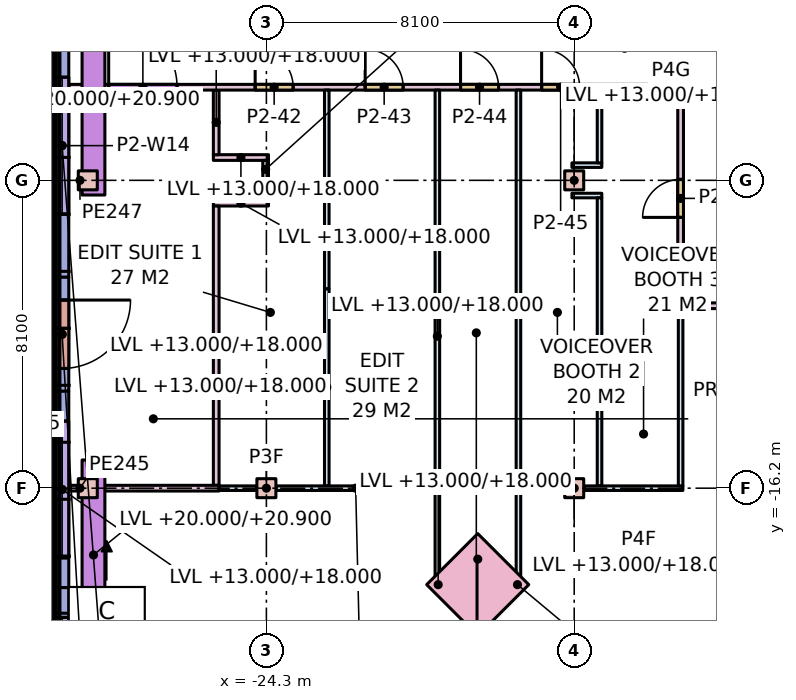
"""IFC4 building model, lengths in metres.
Left out: names, types, materials, properties, quantities, classifications, styles, units other than length and angle.
Written with IfcOpenShell. Run it as: python <this file> out.ifc"""

import sys

from ifc_helpers import new_model, si_unit, direction, frame, frame_2d, origin, origin_2d, place, context, subcontext, project, spatial, rectangle, extrude, element, fill, save


model = new_model("IFC4")
c1 = context("Model", 3, precision=1e-05, world=origin(), true_north=direction((0.0, 1.0)))
c2 = subcontext(c1, "Body", "Model", "MODEL_VIEW")
j1 = project(units=[si_unit("LENGTHUNIT", "METRE"), si_unit("PLANEANGLEUNIT", "RADIAN")], contexts=[c1])
p1 = place(None, origin())
s1 = spatial("IfcSite", under=j1, at=p1, CompositionType="ELEMENT")
p2 = place(p1, origin())
s2 = spatial("IfcBuilding", under=s1, at=p2, CompositionType="ELEMENT")
p3 = place(p2, frame((0.0, 0.0, 13.0)))
s3 = spatial("IfcBuildingStorey", under=s2, at=p3, CompositionType="ELEMENT", Elevation=13.0)
p4 = place(p3, frame((-24.3, -16.2, 0.0), z_axis=(0.0, 0.0, 1.0), x_axis=(1.0, 0.0, 0.0)))
e1 = element("IfcColumn", 1, at=p4, inside=s3, PredefinedType="COLUMN", context=c2, shape_type="SweptSolid", body=[
    extrude(rectangle(XDim=0.5, YDim=0.5, at=origin_2d()), origin(), (0.0, 0.0, 1.0), 7.0),
])
for number, where, z_axis, x_axis in (
    (2, (-16.2, -16.2, 0.0), (0.0, 0.0, 1.0), (1.0, 0.0, 0.0)),
    (3, (-16.2, -8.1, 0.0), (0.0, 0.0, 1.0), (1.0, 0.0, 0.0)),
):
    element("IfcColumn", number, at=place(p3, frame(where, z_axis=z_axis, x_axis=x_axis)), inside=s3, PredefinedType="COLUMN", context=c2, shape_type="SweptSolid", body=[
        extrude(rectangle(XDim=0.5, YDim=0.5, at=origin_2d()), origin(), (0.0, 0.0, 1.0), 5.0),
    ])
for number, where, z_axis, x_axis in (
    (4, (-29.0, -16.2, 0.0), (0.0, 0.0, 1.0), (1.0, 0.0, 0.0)),
    (5, (-29.0, -8.1, 0.0), (0.0, 0.0, 1.0), (1.0, 0.0, 0.0)),
):
    element("IfcColumn", number, at=place(p3, frame(where, z_axis=z_axis, x_axis=x_axis)), inside=s3, PredefinedType="COLUMN", context=c2, shape_type="SweptSolid", body=[
        extrude(rectangle(XDim=0.5, YDim=0.5, at=origin_2d()), origin(), (0.0, 0.0, 1.0), 7.0),
    ])
p5 = place(p3, frame((-18.738, -18.738, 0.0), z_axis=(0.0, 0.0, 1.0), x_axis=(0.707106781187, -0.707106781187, 0.0)))
e6 = element("IfcColumn", 6, at=p5, inside=s3, PredefinedType="COLUMN", context=c2, shape_type="SweptSolid", body=[
    extrude(rectangle(XDim=1.9, YDim=1.9, at=origin_2d()), origin(), (0.0, 0.0, 1.0), 5.0),
])
p6 = place(p3, frame((-29.675, -3.723, 0.0), z_axis=(0.0, 0.0, 1.0), x_axis=(0.0, -1.0, 0.0)))
e7 = element("IfcWall", 7, at=p6, inside=s3, PredefinedType="STANDARD", context=c2, shape_type="SweptSolid", body=[
    extrude(rectangle(XDim=6.927, YDim=0.35, at=frame_2d((3.463, 0.0))), origin(), (0.0, 0.0, 1.0), 5.0),
])
p7 = place(p6, frame((1.663, 0.0, 1.0)))
e8 = element("IfcOpeningElement", 8, at=p7, cuts=e7, PredefinedType="OPENING", context=c2, shape_type="SweptSolid", body=[
    extrude(rectangle(XDim=3.6, YDim=4.0, at=frame_2d((1.8, 2.0))), frame((0.0, 0.185, 0.0), z_axis=(0.0, -1.0, 0.0), x_axis=(1.0, 0.0, 0.0)), (0.0, 0.0, 1.0), 0.37),
])
p8 = place(p3, frame((-29.675, -10.65, 0.0), z_axis=(0.0, 0.0, 1.0), x_axis=(0.0, -1.0, 0.0)))
e9 = element("IfcWall", 9, at=p8, inside=s3, PredefinedType="STANDARD", context=c2, shape_type="SweptSolid", body=[
    extrude(rectangle(XDim=3.0, YDim=0.35, at=frame_2d((1.5, 0.0))), origin(), (0.0, 0.0, 1.0), 5.0),
])
p9 = place(p8, frame((0.6, 0.0, 0.0)))
e10 = element("IfcOpeningElement", 10, at=p9, cuts=e9, PredefinedType="OPENING", context=c2, shape_type="SweptSolid", body=[
    extrude(rectangle(XDim=1.8, YDim=2.7, at=frame_2d((0.9, 1.35))), frame((0.0, 0.185, 0.0), z_axis=(0.0, -1.0, 0.0), x_axis=(1.0, 0.0, 0.0)), (0.0, 0.0, 1.0), 0.37),
])
p10 = place(p3, frame((-29.675, -13.65, 0.0), z_axis=(0.0, 0.0, 1.0), x_axis=(0.0, -1.0, 0.0)))
e11 = element("IfcWall", 11, at=p10, inside=s3, PredefinedType="STANDARD", context=c2, shape_type="SweptSolid", body=[
    extrude(rectangle(XDim=5.167, YDim=0.35, at=frame_2d((2.583, 0.0))), origin(), (0.0, 0.0, 1.0), 5.0),
])
p11 = place(p10, frame((0.783, 0.0, 1.0)))
e12 = element("IfcOpeningElement", 12, at=p11, cuts=e11, PredefinedType="OPENING", context=c2, shape_type="SweptSolid", body=[
    extrude(rectangle(XDim=3.6, YDim=4.0, at=frame_2d((1.8, 2.0))), frame((0.0, 0.185, 0.0), z_axis=(0.0, -1.0, 0.0), x_axis=(1.0, 0.0, 0.0)), (0.0, 0.0, 1.0), 0.37),
])
p12 = place(p3, frame((-29.675, -18.817, 0.0), z_axis=(0.0, 0.0, 1.0), x_axis=(0.0, -1.0, 0.0)))
e13 = element("IfcWall", 13, at=p12, inside=s3, PredefinedType="STANDARD", context=c2, shape_type="SweptSolid", body=[
    extrude(rectangle(XDim=5.167, YDim=0.35, at=frame_2d((2.583, 0.0))), origin(), (0.0, 0.0, 1.0), 5.0),
])
p13 = place(p12, frame((0.783, 0.0, 1.0)))
e14 = element("IfcOpeningElement", 14, at=p13, cuts=e13, PredefinedType="OPENING", context=c2, shape_type="SweptSolid", body=[
    extrude(rectangle(XDim=3.6, YDim=4.0, at=frame_2d((1.8, 2.0))), frame((0.0, 0.185, 0.0), z_axis=(0.0, -1.0, 0.0), x_axis=(1.0, 0.0, 0.0)), (0.0, 0.0, 1.0), 0.37),
])
for number, where, z_axis, x_axis in (
    (15, (-28.85, -3.486, 7.0), (0.0, 0.0, 1.0), (0.0, -1.0, 0.0)),
    (16, (-28.85, -15.458, 7.0), (0.0, 0.0, 1.0), (0.0, -1.0, 0.0)),
):
    element("IfcWall", number, at=place(p3, frame(where, z_axis=z_axis, x_axis=x_axis)), inside=s3, PredefinedType="PARAPET", context=c2, shape_type="SweptSolid", body=[
        extrude(rectangle(XDim=5.0, YDim=0.6, at=frame_2d((2.5, 0.0))), origin(), (0.0, 0.0, 1.0), 0.9),
    ])
p14 = place(p3, frame((-22.711, -16.14, 0.0), z_axis=(0.0, 0.0, 1.0), x_axis=(0.0, 1.0, 0.0)))
e17 = element("IfcWall", 17, at=p14, inside=s3, PredefinedType="PARTITIONING", context=c2, shape_type="SweptSolid", body=[
    extrude(rectangle(XDim=5.188, YDim=0.12, at=frame_2d((2.594, 0.0))), origin(), (0.0, 0.0, 1.0), 5.0),
])
p15 = place(p3, frame((-22.711, -10.952, 0.0), z_axis=(0.0, 0.0, 1.0), x_axis=(0.0, 1.0, 0.0)))
e18 = element("IfcWall", 18, at=p15, inside=s3, PredefinedType="PARTITIONING", context=c2, shape_type="SweptSolid", body=[
    extrude(rectangle(XDim=5.227, YDim=0.12, at=frame_2d((2.614, 0.0))), origin(), (0.0, 0.0, 1.0), 6.68),
])
for number, where, z_axis, x_axis in (
    (19, (-25.696, -8.7, 0.0), (0.0, 0.0, 1.0), (1.0, 0.0, 0.0)),
    (20, (-25.696, -7.5, 0.0), (0.0, 0.0, 1.0), (1.0, 0.0, 0.0)),
):
    element("IfcWall", number, at=place(p3, frame(where, z_axis=z_axis, x_axis=x_axis)), inside=s3, PredefinedType="PARTITIONING", context=c2, shape_type="SweptSolid", body=[
        extrude(rectangle(XDim=1.45, YDim=0.15, at=frame_2d((0.725, 0.0))), origin(), (0.0, 0.0, 1.0), 5.0),
    ])
p16 = place(p3, frame((-25.621, -16.125, 0.0), z_axis=(0.0, 0.0, 1.0), x_axis=(0.0, 1.0, 0.0)))
e21 = element("IfcWall", 21, at=p16, inside=s3, PredefinedType="PARTITIONING", context=c2, shape_type="SweptSolid", body=[
    extrude(rectangle(XDim=7.35, YDim=0.15, at=frame_2d((3.675, 0.0))), origin(), (0.0, 0.0, 1.0), 5.0),
])
p17 = place(p3, frame((-25.621, -7.425, 0.0), z_axis=(0.0, 0.0, 1.0), x_axis=(0.0, 1.0, 0.0)))
e22 = element("IfcWall", 22, at=p17, inside=s3, PredefinedType="PARTITIONING", context=c2, shape_type="SweptSolid", body=[
    extrude(rectangle(XDim=1.7, YDim=0.15, at=frame_2d((0.85, 0.0))), origin(), (0.0, 0.0, 1.0), 5.0),
])
p18 = place(p3, frame((-24.32, -8.625, 0.0), z_axis=(0.0, 0.0, 1.0), x_axis=(0.0, 1.0, 0.0)))
e23 = element("IfcWall", 23, at=p18, inside=s3, PredefinedType="PARTITIONING", context=c2, shape_type="SweptSolid", body=[
    extrude(rectangle(XDim=1.05, YDim=0.15, at=frame_2d((0.525, 0.0))), origin(), (0.0, 0.0, 1.0), 5.0),
])
p19 = place(p3, frame((-25.545, -16.2, 0.0), z_axis=(0.0, 0.0, 1.0), x_axis=(1.0, 0.0, 0.0)))
e24 = element("IfcWall", 24, at=p19, inside=s3, PredefinedType="PARTITIONING", context=c2, shape_type="SweptSolid", body=[
    extrude(rectangle(XDim=0.985, YDim=0.12, at=frame_2d((0.493, 0.0))), origin(), (0.0, 0.0, 1.0), 6.68),
])
p20 = place(p3, frame((-24.04, -16.2, 0.0), z_axis=(0.0, 0.0, 1.0), x_axis=(1.0, 0.0, 0.0)))
e25 = element("IfcWall", 25, at=p20, inside=s3, PredefinedType="PARTITIONING", context=c2, shape_type="SweptSolid", body=[
    extrude(rectangle(XDim=4.179, YDim=0.12, at=frame_2d((2.089, 0.0))), origin(), (0.0, 0.0, 1.0), 5.0),
])
p21 = place(p3, frame((-29.5, -16.2, 0.0), z_axis=(0.0, 0.0, 1.0), x_axis=(1.0, 0.0, 0.0)))
e26 = element("IfcWall", 26, at=p21, inside=s3, PredefinedType="PARTITIONING", context=c2, shape_type="SweptSolid", body=[
    extrude(rectangle(XDim=0.24, YDim=0.15, at=frame_2d((0.12, 0.0))), origin(), (0.0, 0.0, 1.0), 6.68),
])
p22 = place(p3, frame((-28.74, -16.2, 0.0), z_axis=(0.0, 0.0, 1.0), x_axis=(1.0, 0.0, 0.0)))
e27 = element("IfcWall", 27, at=p22, inside=s3, PredefinedType="PARTITIONING", context=c2, shape_type="SweptSolid", body=[
    extrude(rectangle(XDim=3.195, YDim=0.15, at=frame_2d((1.597, 0.0))), origin(), (0.0, 0.0, 1.0), 6.68),
])
p23 = place(p3, frame((-29.5, -5.65, 0.0), z_axis=(0.0, 0.0, 1.0), x_axis=(1.0, 0.0, 0.0)))
e28 = element("IfcWall", 28, at=p23, inside=s3, PredefinedType="PARTITIONING", context=c2, shape_type="SweptSolid", body=[
    extrude(rectangle(XDim=16.175, YDim=0.15, at=frame_2d((8.087, 0.0))), origin(), (0.0, 0.0, 1.0), 5.0),
])
p24 = place(p23, frame((1.05, 0.0, 0.0)))
e29 = element("IfcOpeningElement", 29, at=p24, cuts=e28, PredefinedType="OPENING", context=c2, shape_type="SweptSolid", body=[
    extrude(rectangle(XDim=1.8, YDim=2.4, at=frame_2d((0.9, 1.2))), frame((0.0, 0.085, 0.0), z_axis=(0.0, -1.0, 0.0), x_axis=(1.0, 0.0, 0.0)), (0.0, 0.0, 1.0), 0.17),
])
p25 = place(p23, frame((4.905, 0.0, 0.0)))
e30 = element("IfcOpeningElement", 30, at=p25, cuts=e28, PredefinedType="OPENING", context=c2, shape_type="SweptSolid", body=[
    extrude(rectangle(XDim=1.0, YDim=2.1, at=frame_2d((0.5, 1.05))), frame((0.0, 0.085, 0.0), z_axis=(0.0, -1.0, 0.0), x_axis=(1.0, 0.0, 0.0)), (0.0, 0.0, 1.0), 0.17),
])
p26 = place(p23, frame((7.799, 0.0, 0.0)))
e31 = element("IfcOpeningElement", 31, at=p26, cuts=e28, PredefinedType="OPENING", context=c2, shape_type="SweptSolid", body=[
    extrude(rectangle(XDim=1.0, YDim=2.1, at=frame_2d((0.5, 1.05))), frame((0.0, 0.085, 0.0), z_axis=(0.0, -1.0, 0.0), x_axis=(1.0, 0.0, 0.0)), (0.0, 0.0, 1.0), 0.17),
])
p27 = place(p23, frame((10.309, 0.0, 0.0)))
e32 = element("IfcOpeningElement", 32, at=p27, cuts=e28, PredefinedType="OPENING", context=c2, shape_type="SweptSolid", body=[
    extrude(rectangle(XDim=1.0, YDim=2.1, at=frame_2d((0.5, 1.05))), frame((0.0, 0.085, 0.0), z_axis=(0.0, -1.0, 0.0), x_axis=(1.0, 0.0, 0.0)), (0.0, 0.0, 1.0), 0.17),
])
p28 = place(p23, frame((12.442, 0.0, 0.0)))
e33 = element("IfcOpeningElement", 33, at=p28, cuts=e28, PredefinedType="OPENING", context=c2, shape_type="SweptSolid", body=[
    extrude(rectangle(XDim=1.0, YDim=2.1, at=frame_2d((0.5, 1.05))), frame((0.0, 0.085, 0.0), z_axis=(0.0, -1.0, 0.0), x_axis=(1.0, 0.0, 0.0)), (0.0, 0.0, 1.0), 0.17),
])
p29 = place(p3, frame((-13.4, -11.325, 0.0), z_axis=(0.0, 0.0, 1.0), x_axis=(0.0, 1.0, 0.0)))
e34 = element("IfcWall", 34, at=p29, inside=s3, PredefinedType="PARTITIONING", context=c2, shape_type="SweptSolid", body=[
    extrude(rectangle(XDim=5.6, YDim=0.15, at=frame_2d((2.8, 0.0))), origin(), (0.0, 0.0, 1.0), 5.0),
])
p30 = place(p29, frame((2.25, 0.0, 0.0)))
e35 = element("IfcOpeningElement", 35, at=p30, cuts=e34, PredefinedType="OPENING", context=c2, shape_type="SweptSolid", body=[
    extrude(rectangle(XDim=1.0, YDim=2.1, at=frame_2d((0.5, 1.05))), frame((0.0, 0.085, 0.0), z_axis=(0.0, -1.0, 0.0), x_axis=(1.0, 0.0, 0.0)), (0.0, 0.0, 1.0), 0.17),
])
p31 = place(p3, frame((-13.475, -11.4, 0.0), z_axis=(0.0, 0.0, 1.0), x_axis=(1.0, 0.0, 0.0)))
e36 = element("IfcWall", 36, at=p31, inside=s3, PredefinedType="PARTITIONING", context=c2, shape_type="SweptSolid", body=[
    extrude(rectangle(XDim=4.35, YDim=0.15, at=frame_2d((2.175, 0.0))), origin(), (0.0, 0.0, 1.0), 5.0),
])
p32 = place(p3, frame((-19.861, -18.738, 0.0), z_axis=(0.0, 0.0, 1.0), x_axis=(1.0, 0.0, 0.0)))
e37 = element("IfcWall", 37, at=p32, inside=s3, PredefinedType="PARTITIONING", context=c2, shape_type="SweptSolid", body=[
    extrude(rectangle(XDim=0.163, YDim=0.12, at=frame_2d((0.082, 0.0))), origin(), (0.0, 0.0, 1.0), 5.0),
])
p33 = place(p3, frame((-17.778, -18.738, 0.0), z_axis=(0.0, 0.0, 1.0), x_axis=(1.0, 0.0, 0.0)))
e38 = element("IfcWall", 38, at=p33, inside=s3, PredefinedType="PARTITIONING", context=c2, shape_type="SweptSolid", body=[
    extrude(rectangle(XDim=0.171, YDim=0.12, at=frame_2d((0.085, 0.0))), origin(), (0.0, 0.0, 1.0), 5.0),
])
for number, where, z_axis, x_axis in (
    (39, (-19.801, -18.678, 0.0), (0.0, 0.0, 1.0), (0.0, 1.0, 0.0)),
    (40, (-17.667, -18.678, 0.0), (0.0, 0.0, 1.0), (0.0, 1.0, 0.0)),
):
    element("IfcWall", number, at=place(p3, frame(where, z_axis=z_axis, x_axis=x_axis)), inside=s3, PredefinedType="PARTITIONING", context=c2, shape_type="SweptSolid", body=[
        extrude(rectangle(XDim=12.953, YDim=0.12, at=frame_2d((6.477, 0.0))), origin(), (0.0, 0.0, 1.0), 5.0),
    ])
for number, where, z_axis, x_axis in (
    (41, (-16.26, -8.5, 0.0), (0.0, 0.0, 1.0), (1.0, 0.0, 0.0)),
    (42, (-16.26, -7.7, 0.0), (0.0, 0.0, 1.0), (1.0, 0.0, 0.0)),
):
    element("IfcWall", number, at=place(p3, frame(where, z_axis=z_axis, x_axis=x_axis)), inside=s3, PredefinedType="PARTITIONING", context=c2, shape_type="SweptSolid", body=[
        extrude(rectangle(XDim=0.786, YDim=0.12, at=frame_2d((0.393, 0.0))), origin(), (0.0, 0.0, 1.0), 5.0),
    ])
p34 = place(p3, frame((-15.534, -16.14, 0.0), z_axis=(0.0, 0.0, 1.0), x_axis=(0.0, 1.0, 0.0)))
e43 = element("IfcWall", 43, at=p34, inside=s3, PredefinedType="PARTITIONING", context=c2, shape_type="SweptSolid", body=[
    extrude(rectangle(XDim=7.58, YDim=0.12, at=frame_2d((3.79, 0.0))), origin(), (0.0, 0.0, 1.0), 5.0),
])
p35 = place(p3, frame((-15.534, -7.64, 0.0), z_axis=(0.0, 0.0, 1.0), x_axis=(0.0, 1.0, 0.0)))
e44 = element("IfcWall", 44, at=p35, inside=s3, PredefinedType="PARTITIONING", context=c2, shape_type="SweptSolid", body=[
    extrude(rectangle(XDim=1.915, YDim=0.12, at=frame_2d((0.958, 0.0))), origin(), (0.0, 0.0, 1.0), 5.0),
])
p36 = place(p3, frame((-17.607, -16.2, 0.0), z_axis=(0.0, 0.0, 1.0), x_axis=(1.0, 0.0, 0.0)))
e45 = element("IfcWall", 45, at=p36, inside=s3, PredefinedType="PARTITIONING", context=c2, shape_type="SweptSolid", body=[
    extrude(rectangle(XDim=1.147, YDim=0.12, at=frame_2d((0.574, 0.0))), origin(), (0.0, 0.0, 1.0), 6.68),
])
p37 = place(p3, frame((-15.94, -16.2, 0.0), z_axis=(0.0, 0.0, 1.0), x_axis=(1.0, 0.0, 0.0)))
e46 = element("IfcWall", 46, at=p37, inside=s3, PredefinedType="PARTITIONING", context=c2, shape_type="SweptSolid", body=[
    extrude(rectangle(XDim=2.6, YDim=0.12, at=frame_2d((1.3, 0.0))), origin(), (0.0, 0.0, 1.0), 5.0),
])
p38 = place(p3, frame((-13.4, -16.14, 0.0), z_axis=(0.0, 0.0, 1.0), x_axis=(0.0, 1.0, 0.0)))
e47 = element("IfcWall", 47, at=p38, inside=s3, PredefinedType="PARTITIONING", context=c2, shape_type="SweptSolid", body=[
    extrude(rectangle(XDim=4.665, YDim=0.12, at=frame_2d((2.333, 0.0))), origin(), (0.0, 0.0, 1.0), 5.0),
])
p39 = place(p7, origin())
e48 = element("IfcWindow", 48, at=p39, inside=s3, PartitioningType="SINGLE_PANEL", PredefinedType="WINDOW", context=c2, shape_type="SweptSolid", body=[
    extrude(rectangle(XDim=3.6, YDim=4.0, at=frame_2d((1.8, 2.0))), frame((0.0, 0.03, 0.0), z_axis=(0.0, -1.0, 0.0), x_axis=(1.0, 0.0, 0.0)), (0.0, 0.0, 1.0), 0.06),
])
fill(e8, e48)
p40 = place(p11, origin())
e49 = element("IfcWindow", 49, at=p40, inside=s3, PartitioningType="SINGLE_PANEL", PredefinedType="WINDOW", context=c2, shape_type="SweptSolid", body=[
    extrude(rectangle(XDim=3.6, YDim=4.0, at=frame_2d((1.8, 2.0))), frame((0.0, 0.03, 0.0), z_axis=(0.0, -1.0, 0.0), x_axis=(1.0, 0.0, 0.0)), (0.0, 0.0, 1.0), 0.06),
])
fill(e12, e49)
p41 = place(p13, origin())
e50 = element("IfcWindow", 50, at=p41, inside=s3, PartitioningType="SINGLE_PANEL", PredefinedType="WINDOW", context=c2, shape_type="SweptSolid", body=[
    extrude(rectangle(XDim=3.6, YDim=4.0, at=frame_2d((1.8, 2.0))), frame((0.0, 0.03, 0.0), z_axis=(0.0, -1.0, 0.0), x_axis=(1.0, 0.0, 0.0)), (0.0, 0.0, 1.0), 0.06),
])
fill(e14, e50)
p42 = place(p24, origin())
e51 = element("IfcDoor", 51, at=p42, inside=s3, OperationType="SINGLE_SWING_LEFT", PredefinedType="DOOR", context=c2, shape_type="SweptSolid", body=[
    extrude(rectangle(XDim=1.8, YDim=2.4, at=frame_2d((0.9, 1.2))), frame((0.0, 0.025, 0.0), z_axis=(0.0, -1.0, 0.0), x_axis=(1.0, 0.0, 0.0)), (0.0, 0.0, 1.0), 0.05),
])
fill(e29, e51)
p43 = place(p25, origin())
e52 = element("IfcDoor", 52, at=p43, inside=s3, OperationType="SINGLE_SWING_LEFT", PredefinedType="DOOR", context=c2, shape_type="SweptSolid", body=[
    extrude(rectangle(XDim=1.0, YDim=2.1, at=frame_2d((0.5, 1.05))), frame((0.0, 0.025, 0.0), z_axis=(0.0, -1.0, 0.0), x_axis=(1.0, 0.0, 0.0)), (0.0, 0.0, 1.0), 0.05),
])
fill(e30, e52)
p44 = place(p26, origin())
e53 = element("IfcDoor", 53, at=p44, inside=s3, OperationType="SINGLE_SWING_LEFT", PredefinedType="DOOR", context=c2, shape_type="SweptSolid", body=[
    extrude(rectangle(XDim=1.0, YDim=2.1, at=frame_2d((0.5, 1.05))), frame((0.0, 0.025, 0.0), z_axis=(0.0, -1.0, 0.0), x_axis=(1.0, 0.0, 0.0)), (0.0, 0.0, 1.0), 0.05),
])
fill(e31, e53)
p45 = place(p27, origin())
e54 = element("IfcDoor", 54, at=p45, inside=s3, OperationType="SINGLE_SWING_LEFT", PredefinedType="DOOR", context=c2, shape_type="SweptSolid", body=[
    extrude(rectangle(XDim=1.0, YDim=2.1, at=frame_2d((0.5, 1.05))), frame((0.0, 0.025, 0.0), z_axis=(0.0, -1.0, 0.0), x_axis=(1.0, 0.0, 0.0)), (0.0, 0.0, 1.0), 0.05),
])
fill(e32, e54)
p46 = place(p28, origin())
e55 = element("IfcDoor", 55, at=p46, inside=s3, OperationType="SINGLE_SWING_LEFT", PredefinedType="DOOR", context=c2, shape_type="SweptSolid", body=[
    extrude(rectangle(XDim=1.0, YDim=2.1, at=frame_2d((0.5, 1.05))), frame((0.0, 0.025, 0.0), z_axis=(0.0, -1.0, 0.0), x_axis=(1.0, 0.0, 0.0)), (0.0, 0.0, 1.0), 0.05),
])
fill(e33, e55)
p47 = place(p30, origin())
e56 = element("IfcDoor", 56, at=p47, inside=s3, OperationType="SINGLE_SWING_LEFT", PredefinedType="DOOR", context=c2, shape_type="SweptSolid", body=[
    extrude(rectangle(XDim=1.0, YDim=2.1, at=frame_2d((0.5, 1.05))), frame((0.0, 0.025, 0.0), z_axis=(0.0, -1.0, 0.0), x_axis=(1.0, 0.0, 0.0)), (0.0, 0.0, 1.0), 0.05),
])
fill(e35, e56)
p48 = place(p9, origin())
e57 = element("IfcDoor", 57, at=p48, inside=s3, OperationType="SINGLE_SWING_LEFT", PredefinedType="DOOR", context=c2, shape_type="SweptSolid", body=[
    extrude(rectangle(XDim=1.8, YDim=2.7, at=frame_2d((0.9, 1.35))), frame((0.0, 0.025, 0.0), z_axis=(0.0, -1.0, 0.0), x_axis=(1.0, 0.0, 0.0)), (0.0, 0.0, 1.0), 0.05),
])
fill(e10, e57)
save(model, sys.argv[1])
